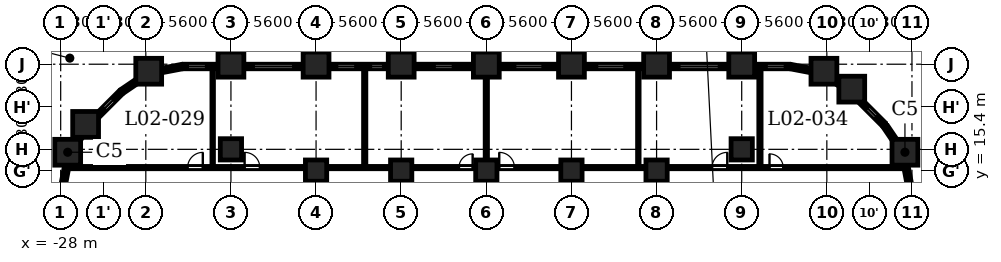
"""IFC4 building model, lengths in metres.
Left out: names, types, materials, properties, quantities, classifications, styles, units other than length and angle.
Written with IfcOpenShell. Run it as: python <this file> out.ifc"""

import sys

from ifc_helpers import new_model, si_unit, direction, frame, frame_2d, origin, origin_2d, place, context, subcontext, project, spatial, rectangle, extrude, element, fill, save


model = new_model("IFC4")
c1 = context("Model", 3, precision=1e-05, world=origin(), true_north=direction((0.0, 1.0)))
c2 = subcontext(c1, "Body", "Model", "MODEL_VIEW")
j1 = project(units=[si_unit("LENGTHUNIT", "METRE"), si_unit("PLANEANGLEUNIT", "RADIAN")], contexts=[c1])
p1 = place(None, origin())
s1 = spatial("IfcSite", under=j1, at=p1, CompositionType="ELEMENT")
p2 = place(p1, origin())
s2 = spatial("IfcBuilding", under=s1, at=p2, CompositionType="ELEMENT")
p3 = place(p2, frame((0.0, 0.0, 11.3)))
s3 = spatial("IfcBuildingStorey", under=s2, at=p3, CompositionType="ELEMENT", Elevation=11.3)
for number, where, z_axis, x_axis in (
    (1, (27.538, 16.609, 0.0), (0.0, 0.0, 1.0), (1.0, 0.0, 0.0)),
    (2, (24.04, 20.76, 0.0), (0.0, 0.0, 1.0), (1.0, 0.0, 0.0)),
    (3, (22.209, 21.938, 0.0), (0.0, 0.0, 1.0), (1.0, 0.0, 0.0)),
    (4, (16.8, 22.4, 0.0), (0.0, 0.0, 1.0), (1.0, 0.0, 0.0)),
    (5, (11.2, 22.4, 0.0), (0.0, 0.0, 1.0), (1.0, 0.0, 0.0)),
    (6, (5.6, 22.4, 0.0), (0.0, 0.0, 1.0), (1.0, 0.0, 0.0)),
    (7, (0.0, 22.4, 0.0), (0.0, 0.0, 1.0), (1.0, 0.0, 0.0)),
    (8, (-5.6, 22.4, 0.0), (0.0, 0.0, 1.0), (1.0, 0.0, 0.0)),
    (9, (-11.2, 22.4, 0.0), (0.0, 0.0, 1.0), (1.0, 0.0, 0.0)),
    (10, (-16.8, 22.4, 0.0), (0.0, 0.0, 1.0), (1.0, 0.0, 0.0)),
    (11, (-22.209, 21.938, 0.0), (0.0, 0.0, 1.0), (1.0, 0.0, 0.0)),
    (12, (-26.36, 18.44, 0.0), (0.0, 0.0, 1.0), (1.0, 0.0, 0.0)),
    (13, (-27.538, 16.609, 0.0), (0.0, 0.0, 1.0), (1.0, 0.0, 0.0)),
):
    element("IfcColumn", number, at=place(p3, frame(where, z_axis=z_axis, x_axis=x_axis)), inside=s3, PredefinedType="COLUMN", context=c2, shape_type="SweptSolid", body=[
        extrude(rectangle(XDim=1.7, YDim=1.7, at=origin_2d()), origin(), (0.0, 0.0, 1.0), 4.8),
    ])
for number, where, z_axis, x_axis in (
    (14, (-16.8, 16.8, 0.0), (0.0, 0.0, 1.0), (1.0, 0.0, 0.0)),
    (15, (16.8, 16.8, 0.0), (0.0, 0.0, 1.0), (1.0, 0.0, 0.0)),
    (16, (-11.2, 15.4, 0.0), (0.0, 0.0, 1.0), (1.0, 0.0, 0.0)),
    (17, (-5.6, 15.4, 0.0), (0.0, 0.0, 1.0), (1.0, 0.0, 0.0)),
    (18, (0.0, 15.4, 0.0), (0.0, 0.0, 1.0), (1.0, 0.0, 0.0)),
    (19, (5.6, 15.4, 0.0), (0.0, 0.0, 1.0), (1.0, 0.0, 0.0)),
    (20, (11.2, 15.4, 0.0), (0.0, 0.0, 1.0), (1.0, 0.0, 0.0)),
):
    element("IfcColumn", number, at=place(p3, frame(where, z_axis=z_axis, x_axis=x_axis)), inside=s3, PredefinedType="COLUMN", context=c2, shape_type="SweptSolid", body=[
        extrude(rectangle(XDim=1.4, YDim=1.4, at=origin_2d()), origin(), (0.0, 0.0, 1.0), 4.8),
    ])
for number, where, z_axis, x_axis in (
    (21, (27.853, 14.372, 0.0), (0.0, 0.0, 1.0), (-0.187, 0.982, 0.0)),
    (22, (26.969, 17.25, 0.0), (0.0, 0.0, 1.0), (-0.562, 0.827, 0.0)),
):
    element("IfcWall", number, at=place(p3, frame(where, z_axis=z_axis, x_axis=x_axis)), inside=s3, PredefinedType="SOLIDWALL", context=c2, shape_type="SweptSolid", body=[
        extrude(rectangle(XDim=1.406, YDim=0.3, at=frame_2d((0.703, 0.0))), origin(), (0.0, 0.0, 1.0), 3.55),
    ])
p4 = place(p3, frame((26.197, 18.391, 0.0), z_axis=(0.0, 0.0, 1.0), x_axis=(-0.707054835785, 0.707158722772, 0.0)))
e23 = element("IfcWall", 23, at=p4, inside=s3, PredefinedType="SOLIDWALL", context=c2, shape_type="SweptSolid", body=[
    extrude(rectangle(XDim=2.35, YDim=0.3, at=frame_2d((1.175, 0.0))), origin(), (0.0, 0.0, 1.0), 3.55),
])
p5 = place(p4, frame((0.775, 0.0, 0.6)))
e24 = element("IfcOpeningElement", 24, at=p5, cuts=e23, PredefinedType="OPENING", context=c2, shape_type="SweptSolid", body=[
    extrude(rectangle(XDim=0.8, YDim=1.55, at=frame_2d((0.4, 0.775))), frame((0.0, 0.16, 0.0), z_axis=(0.0, -1.0, 0.0), x_axis=(1.0, 0.0, 0.0)), (0.0, 0.0, 1.0), 0.32),
])
p6 = place(p3, frame((23.244, 21.101, 0.0), z_axis=(0.0, 0.0, 1.0), x_axis=(-0.827135885329, 0.562001981492, 0.0)))
e25 = element("IfcWall", 25, at=p6, inside=s3, PredefinedType="SOLIDWALL", context=c2, shape_type="SweptSolid", body=[
    extrude(rectangle(XDim=0.477, YDim=0.3, at=frame_2d((0.239, 0.0))), origin(), (0.0, 0.0, 1.0), 4.45),
])
p7 = place(p3, frame((21.353, 21.989, 0.0), z_axis=(0.0, 0.0, 1.0), x_axis=(-0.98229142023, 0.187359455971, 0.0)))
e26 = element("IfcWall", 26, at=p7, inside=s3, PredefinedType="SOLIDWALL", context=c2, shape_type="SweptSolid", body=[
    extrude(rectangle(XDim=1.406, YDim=0.3, at=frame_2d((0.703, 0.0))), origin(), (0.0, 0.0, 1.0), 3.55),
])
p8 = place(p3, frame((20.0, 22.25, 0.0), z_axis=(0.0, 0.0, 1.0), x_axis=(-1.0, 0.0, 0.0)))
e27 = element("IfcWall", 27, at=p8, inside=s3, PredefinedType="SOLIDWALL", context=c2, shape_type="SweptSolid", body=[
    extrude(rectangle(XDim=2.35, YDim=0.3, at=frame_2d((1.175, 0.0))), origin(), (0.0, 0.0, 1.0), 3.55),
])
p9 = place(p8, frame((0.363, 0.0, 0.6)))
e28 = element("IfcOpeningElement", 28, at=p9, cuts=e27, PredefinedType="OPENING", context=c2, shape_type="SweptSolid", body=[
    extrude(rectangle(XDim=1.2, YDim=1.55, at=frame_2d((0.6, 0.775))), frame((0.0, 0.16, 0.0), z_axis=(0.0, -1.0, 0.0), x_axis=(1.0, 0.0, 0.0)), (0.0, 0.0, 1.0), 0.32),
])
p10 = place(p3, frame((15.95, 22.25, 0.0), z_axis=(0.0, 0.0, 1.0), x_axis=(-1.0, 0.0, 0.0)))
e29 = element("IfcWall", 29, at=p10, inside=s3, PredefinedType="SOLIDWALL", context=c2, shape_type="SweptSolid", body=[
    extrude(rectangle(XDim=3.9, YDim=0.3, at=frame_2d((1.95, 0.0))), origin(), (0.0, 0.0, 1.0), 3.55),
])
p11 = place(p10, frame((0.65, 0.0, 0.9)))
e30 = element("IfcOpeningElement", 30, at=p11, cuts=e29, PredefinedType="OPENING", context=c2, shape_type="SweptSolid", body=[
    extrude(rectangle(XDim=2.6, YDim=1.25, at=frame_2d((1.3, 0.625))), frame((0.0, 0.16, 0.0), z_axis=(0.0, -1.0, 0.0), x_axis=(1.0, 0.0, 0.0)), (0.0, 0.0, 1.0), 0.32),
])
p12 = place(p3, frame((10.35, 22.25, 0.0), z_axis=(0.0, 0.0, 1.0), x_axis=(-1.0, 0.0, 0.0)))
e31 = element("IfcWall", 31, at=p12, inside=s3, PredefinedType="SOLIDWALL", context=c2, shape_type="SweptSolid", body=[
    extrude(rectangle(XDim=3.9, YDim=0.3, at=frame_2d((1.95, 0.0))), origin(), (0.0, 0.0, 1.0), 3.55),
])
p13 = place(p12, frame((1.262, 0.0, 0.9)))
e32 = element("IfcOpeningElement", 32, at=p13, cuts=e31, PredefinedType="OPENING", context=c2, shape_type="SweptSolid", body=[
    extrude(rectangle(XDim=1.8, YDim=1.25, at=frame_2d((0.9, 0.625))), frame((0.0, 0.16, 0.0), z_axis=(0.0, -1.0, 0.0), x_axis=(1.0, 0.0, 0.0)), (0.0, 0.0, 1.0), 0.32),
])
p14 = place(p3, frame((4.75, 22.25, 0.0), z_axis=(0.0, 0.0, 1.0), x_axis=(-1.0, 0.0, 0.0)))
e33 = element("IfcWall", 33, at=p14, inside=s3, PredefinedType="SOLIDWALL", context=c2, shape_type="SweptSolid", body=[
    extrude(rectangle(XDim=3.9, YDim=0.3, at=frame_2d((1.95, 0.0))), origin(), (0.0, 0.0, 1.0), 3.55),
])
p15 = place(p14, frame((1.05, 0.0, 0.9)))
e34 = element("IfcOpeningElement", 34, at=p15, cuts=e33, PredefinedType="OPENING", context=c2, shape_type="SweptSolid", body=[
    extrude(rectangle(XDim=1.8, YDim=1.25, at=frame_2d((0.9, 0.625))), frame((0.0, 0.16, 0.0), z_axis=(0.0, -1.0, 0.0), x_axis=(1.0, 0.0, 0.0)), (0.0, 0.0, 1.0), 0.32),
])
p16 = place(p3, frame((-0.85, 22.25, 0.0), z_axis=(0.0, 0.0, 1.0), x_axis=(-1.0, 0.0, 0.0)))
e35 = element("IfcWall", 35, at=p16, inside=s3, PredefinedType="SOLIDWALL", context=c2, shape_type="SweptSolid", body=[
    extrude(rectangle(XDim=3.9, YDim=0.3, at=frame_2d((1.95, 0.0))), origin(), (0.0, 0.0, 1.0), 3.55),
])
p17 = place(p16, frame((1.35, 0.0, 0.6)))
e36 = element("IfcOpeningElement", 36, at=p17, cuts=e35, PredefinedType="OPENING", context=c2, shape_type="SweptSolid", body=[
    extrude(rectangle(XDim=1.2, YDim=1.55, at=frame_2d((0.6, 0.775))), frame((0.0, 0.16, 0.0), z_axis=(0.0, -1.0, 0.0), x_axis=(1.0, 0.0, 0.0)), (0.0, 0.0, 1.0), 0.32),
])
p18 = place(p3, frame((-6.45, 22.25, 0.0), z_axis=(0.0, 0.0, 1.0), x_axis=(-1.0, 0.0, 0.0)))
e37 = element("IfcWall", 37, at=p18, inside=s3, PredefinedType="SOLIDWALL", context=c2, shape_type="SweptSolid", body=[
    extrude(rectangle(XDim=3.9, YDim=0.3, at=frame_2d((1.95, 0.0))), origin(), (0.0, 0.0, 1.0), 3.55),
])
p19 = place(p18, frame((0.337, 0.0, 0.6)))
e38 = element("IfcOpeningElement", 38, at=p19, cuts=e37, PredefinedType="OPENING", context=c2, shape_type="SweptSolid", body=[
    extrude(rectangle(XDim=0.8, YDim=1.55, at=frame_2d((0.4, 0.775))), frame((0.0, 0.16, 0.0), z_axis=(0.0, -1.0, 0.0), x_axis=(1.0, 0.0, 0.0)), (0.0, 0.0, 1.0), 0.32),
])
p20 = place(p18, frame((2.163, 0.0, 0.6)))
e39 = element("IfcOpeningElement", 39, at=p20, cuts=e37, PredefinedType="OPENING", context=c2, shape_type="SweptSolid", body=[
    extrude(rectangle(XDim=1.2, YDim=1.55, at=frame_2d((0.6, 0.775))), frame((0.0, 0.16, 0.0), z_axis=(0.0, -1.0, 0.0), x_axis=(1.0, 0.0, 0.0)), (0.0, 0.0, 1.0), 0.32),
])
p21 = place(p3, frame((-12.05, 22.25, 0.0), z_axis=(0.0, 0.0, 1.0), x_axis=(-1.0, 0.0, 0.0)))
e40 = element("IfcWall", 40, at=p21, inside=s3, PredefinedType="SOLIDWALL", context=c2, shape_type="SweptSolid", body=[
    extrude(rectangle(XDim=3.9, YDim=0.3, at=frame_2d((1.95, 0.0))), origin(), (0.0, 0.0, 1.0), 3.55),
])
p22 = place(p21, frame((0.65, 0.0, 0.9)))
e41 = element("IfcOpeningElement", 41, at=p22, cuts=e40, PredefinedType="OPENING", context=c2, shape_type="SweptSolid", body=[
    extrude(rectangle(XDim=2.6, YDim=1.25, at=frame_2d((1.3, 0.625))), frame((0.0, 0.16, 0.0), z_axis=(0.0, -1.0, 0.0), x_axis=(1.0, 0.0, 0.0)), (0.0, 0.0, 1.0), 0.32),
])
p23 = place(p3, frame((-17.65, 22.25, 0.0), z_axis=(0.0, 0.0, 1.0), x_axis=(-1.0, 0.0, 0.0)))
e42 = element("IfcWall", 42, at=p23, inside=s3, PredefinedType="SOLIDWALL", context=c2, shape_type="SweptSolid", body=[
    extrude(rectangle(XDim=2.35, YDim=0.3, at=frame_2d((1.175, 0.0))), origin(), (0.0, 0.0, 1.0), 3.55),
])
p24 = place(p23, frame((0.788, 0.0, 0.6)))
e43 = element("IfcOpeningElement", 43, at=p24, cuts=e42, PredefinedType="OPENING", context=c2, shape_type="SweptSolid", body=[
    extrude(rectangle(XDim=1.2, YDim=1.55, at=frame_2d((0.6, 0.775))), frame((0.0, 0.16, 0.0), z_axis=(0.0, -1.0, 0.0), x_axis=(1.0, 0.0, 0.0)), (0.0, 0.0, 1.0), 0.32),
])
for number, where, z_axis, x_axis in (
    (44, (-19.972, 22.253, 0.0), (0.0, 0.0, 1.0), (-0.982, -0.187, 0.0)),
    (45, (-22.85, 21.369, 0.0), (0.0, 0.0, 1.0), (-0.827, -0.562, 0.0)),
):
    element("IfcWall", number, at=place(p3, frame(where, z_axis=z_axis, x_axis=x_axis)), inside=s3, PredefinedType="SOLIDWALL", context=c2, shape_type="SweptSolid", body=[
        extrude(rectangle(XDim=1.406, YDim=0.3, at=frame_2d((0.703, 0.0))), origin(), (0.0, 0.0, 1.0), 3.55),
    ])
p25 = place(p3, frame((-23.991, 20.597, 0.0), z_axis=(0.0, 0.0, 1.0), x_axis=(-0.707054835785, -0.707158722772, 0.0)))
e46 = element("IfcWall", 46, at=p25, inside=s3, PredefinedType="SOLIDWALL", context=c2, shape_type="SweptSolid", body=[
    extrude(rectangle(XDim=2.35, YDim=0.3, at=frame_2d((1.175, 0.0))), origin(), (0.0, 0.0, 1.0), 3.55),
])
p26 = place(p25, frame((0.775, 0.0, 0.6)))
e47 = element("IfcOpeningElement", 47, at=p26, cuts=e46, PredefinedType="OPENING", context=c2, shape_type="SweptSolid", body=[
    extrude(rectangle(XDim=0.8, YDim=1.55, at=frame_2d((0.4, 0.775))), frame((0.0, 0.16, 0.0), z_axis=(0.0, -1.0, 0.0), x_axis=(1.0, 0.0, 0.0)), (0.0, 0.0, 1.0), 0.32),
])
p27 = place(p3, frame((-26.701, 17.644, 0.0), z_axis=(0.0, 0.0, 1.0), x_axis=(-0.562001981492, -0.827135885329, 0.0)))
e48 = element("IfcWall", 48, at=p27, inside=s3, PredefinedType="SOLIDWALL", context=c2, shape_type="SweptSolid", body=[
    extrude(rectangle(XDim=0.477, YDim=0.3, at=frame_2d((0.239, 0.0))), origin(), (0.0, 0.0, 1.0), 4.45),
])
p28 = place(p3, frame((-27.589, 15.753, 0.0), z_axis=(0.0, 0.0, 1.0), x_axis=(-0.187327504018, -0.982297514116, 0.0)))
e49 = element("IfcWall", 49, at=p28, inside=s3, PredefinedType="SOLIDWALL", context=c2, shape_type="SweptSolid", body=[
    extrude(rectangle(XDim=1.406, YDim=0.3, at=frame_2d((0.703, 0.0))), origin(), (0.0, 0.0, 1.0), 3.55),
])
p29 = place(p3, frame((-27.446, 15.6, 0.0), z_axis=(0.0, 0.0, 1.0), x_axis=(1.0, 0.0, 0.0)))
e50 = element("IfcWall", 50, at=p29, inside=s3, PredefinedType="PARTITIONING", context=c2, shape_type="SweptSolid", body=[
    extrude(rectangle(XDim=54.892, YDim=0.15, at=frame_2d((27.446, 0.0))), origin(), (0.0, 0.0, 1.0), 4.45),
])
p30 = place(p29, frame((7.796, 0.0, 0.0)))
e51 = element("IfcOpeningElement", 51, at=p30, cuts=e50, PredefinedType="OPENING", context=c2, shape_type="SweptSolid", body=[
    extrude(rectangle(XDim=1.0, YDim=2.1, at=frame_2d((0.5, 1.05))), frame((0.0, 0.085, 0.0), z_axis=(0.0, -1.0, 0.0), x_axis=(1.0, 0.0, 0.0)), (0.0, 0.0, 1.0), 0.17),
])
p31 = place(p29, frame((11.546, 0.0, 0.0)))
e52 = element("IfcOpeningElement", 52, at=p31, cuts=e50, PredefinedType="OPENING", context=c2, shape_type="SweptSolid", body=[
    extrude(rectangle(XDim=1.0, YDim=2.1, at=frame_2d((0.5, 1.05))), frame((0.0, 0.085, 0.0), z_axis=(0.0, -1.0, 0.0), x_axis=(1.0, 0.0, 0.0)), (0.0, 0.0, 1.0), 0.17),
])
p32 = place(p29, frame((25.646, 0.0, 0.0)))
e53 = element("IfcOpeningElement", 53, at=p32, cuts=e50, PredefinedType="OPENING", context=c2, shape_type="SweptSolid", body=[
    extrude(rectangle(XDim=0.9, YDim=2.1, at=frame_2d((0.45, 1.05))), frame((0.0, 0.085, 0.0), z_axis=(0.0, -1.0, 0.0), x_axis=(1.0, 0.0, 0.0)), (0.0, 0.0, 1.0), 0.17),
])
p33 = place(p29, frame((28.296, 0.0, 0.0)))
e54 = element("IfcOpeningElement", 54, at=p33, cuts=e50, PredefinedType="OPENING", context=c2, shape_type="SweptSolid", body=[
    extrude(rectangle(XDim=1.0, YDim=2.1, at=frame_2d((0.5, 1.05))), frame((0.0, 0.085, 0.0), z_axis=(0.0, -1.0, 0.0), x_axis=(1.0, 0.0, 0.0)), (0.0, 0.0, 1.0), 0.17),
])
p34 = place(p29, frame((42.296, 0.0, 0.0)))
e55 = element("IfcOpeningElement", 55, at=p34, cuts=e50, PredefinedType="OPENING", context=c2, shape_type="SweptSolid", body=[
    extrude(rectangle(XDim=1.0, YDim=2.1, at=frame_2d((0.5, 1.05))), frame((0.0, 0.085, 0.0), z_axis=(0.0, -1.0, 0.0), x_axis=(1.0, 0.0, 0.0)), (0.0, 0.0, 1.0), 0.17),
])
p35 = place(p29, frame((46.075, 0.0, 0.0)))
e56 = element("IfcOpeningElement", 56, at=p35, cuts=e50, PredefinedType="OPENING", context=c2, shape_type="SweptSolid", body=[
    extrude(rectangle(XDim=0.9, YDim=2.1, at=frame_2d((0.45, 1.05))), frame((0.0, 0.085, 0.0), z_axis=(0.0, -1.0, 0.0), x_axis=(1.0, 0.0, 0.0)), (0.0, 0.0, 1.0), 0.17),
])
p36 = place(p3, frame((-18.0, 15.675, 0.0), z_axis=(0.0, 0.0, 1.0), x_axis=(0.0, 1.0, 0.0)))
e57 = element("IfcWall", 57, at=p36, inside=s3, PredefinedType="PARTITIONING", context=c2, shape_type="SweptSolid", body=[
    extrude(rectangle(XDim=6.405, YDim=0.1, at=frame_2d((3.203, 0.0))), origin(), (0.0, 0.0, 1.0), 4.45),
])
p37 = place(p3, frame((-8.0, 15.675, 0.0), z_axis=(0.0, 0.0, 1.0), x_axis=(0.0, 1.0, 0.0)))
e58 = element("IfcWall", 58, at=p37, inside=s3, PredefinedType="PARTITIONING", context=c2, shape_type="SweptSolid", body=[
    extrude(rectangle(XDim=6.405, YDim=0.15, at=frame_2d((3.203, 0.0))), origin(), (0.0, 0.0, 1.0), 4.45),
])
p38 = place(p3, frame((0.0, 15.675, 0.0), z_axis=(0.0, 0.0, 1.0), x_axis=(0.0, 1.0, 0.0)))
e59 = element("IfcWall", 59, at=p38, inside=s3, PredefinedType="PARTITIONING", context=c2, shape_type="SweptSolid", body=[
    extrude(rectangle(XDim=6.635, YDim=0.15, at=frame_2d((3.317, 0.0))), origin(), (0.0, 0.0, 1.0), 4.45),
])
p39 = place(p3, frame((10.0, 15.675, 0.0), z_axis=(0.0, 0.0, 1.0), x_axis=(0.0, 1.0, 0.0)))
e60 = element("IfcWall", 60, at=p39, inside=s3, PredefinedType="PARTITIONING", context=c2, shape_type="SweptSolid", body=[
    extrude(rectangle(XDim=6.405, YDim=0.1, at=frame_2d((3.203, 0.0))), origin(), (0.0, 0.0, 1.0), 4.45),
])
p40 = place(p3, frame((18.0, 15.675, 0.0), z_axis=(0.0, 0.0, 1.0), x_axis=(0.0, 1.0, 0.0)))
e61 = element("IfcWall", 61, at=p40, inside=s3, PredefinedType="PARTITIONING", context=c2, shape_type="SweptSolid", body=[
    extrude(rectangle(XDim=6.405, YDim=0.15, at=frame_2d((3.203, 0.0))), origin(), (0.0, 0.0, 1.0), 4.45),
])
p41 = place(p30, origin())
e62 = element("IfcDoor", 62, at=p41, inside=s3, OperationType="SINGLE_SWING_LEFT", PredefinedType="DOOR", context=c2, shape_type="SweptSolid", body=[
    extrude(rectangle(XDim=1.0, YDim=2.1, at=frame_2d((0.5, 1.05))), frame((0.0, 0.025, 0.0), z_axis=(0.0, -1.0, 0.0), x_axis=(1.0, 0.0, 0.0)), (0.0, 0.0, 1.0), 0.05),
])
fill(e51, e62)
p42 = place(p31, origin())
e63 = element("IfcDoor", 63, at=p42, inside=s3, OperationType="SINGLE_SWING_RIGHT", PredefinedType="DOOR", context=c2, shape_type="SweptSolid", body=[
    extrude(rectangle(XDim=1.0, YDim=2.1, at=frame_2d((0.5, 1.05))), frame((0.0, 0.025, 0.0), z_axis=(0.0, -1.0, 0.0), x_axis=(1.0, 0.0, 0.0)), (0.0, 0.0, 1.0), 0.05),
])
fill(e52, e63)
p43 = place(p32, origin())
e64 = element("IfcDoor", 64, at=p43, inside=s3, OperationType="SINGLE_SWING_LEFT", PredefinedType="DOOR", context=c2, shape_type="SweptSolid", body=[
    extrude(rectangle(XDim=0.9, YDim=2.1, at=frame_2d((0.45, 1.05))), frame((0.0, 0.025, 0.0), z_axis=(0.0, -1.0, 0.0), x_axis=(1.0, 0.0, 0.0)), (0.0, 0.0, 1.0), 0.05),
])
fill(e53, e64)
p44 = place(p33, origin())
e65 = element("IfcDoor", 65, at=p44, inside=s3, OperationType="SINGLE_SWING_RIGHT", PredefinedType="DOOR", context=c2, shape_type="SweptSolid", body=[
    extrude(rectangle(XDim=1.0, YDim=2.1, at=frame_2d((0.5, 1.05))), frame((0.0, 0.025, 0.0), z_axis=(0.0, -1.0, 0.0), x_axis=(1.0, 0.0, 0.0)), (0.0, 0.0, 1.0), 0.05),
])
fill(e54, e65)
p45 = place(p34, origin())
e66 = element("IfcDoor", 66, at=p45, inside=s3, OperationType="SINGLE_SWING_LEFT", PredefinedType="DOOR", context=c2, shape_type="SweptSolid", body=[
    extrude(rectangle(XDim=1.0, YDim=2.1, at=frame_2d((0.5, 1.05))), frame((0.0, 0.025, 0.0), z_axis=(0.0, -1.0, 0.0), x_axis=(1.0, 0.0, 0.0)), (0.0, 0.0, 1.0), 0.05),
])
fill(e55, e66)
p46 = place(p35, origin())
e67 = element("IfcDoor", 67, at=p46, inside=s3, OperationType="SINGLE_SWING_RIGHT", PredefinedType="DOOR", context=c2, shape_type="SweptSolid", body=[
    extrude(rectangle(XDim=0.9, YDim=2.1, at=frame_2d((0.45, 1.05))), frame((0.0, 0.025, 0.0), z_axis=(0.0, -1.0, 0.0), x_axis=(1.0, 0.0, 0.0)), (0.0, 0.0, 1.0), 0.05),
])
fill(e56, e67)
p47 = place(p5, origin())
e68 = element("IfcWindow", 68, at=p47, inside=s3, PartitioningType="SINGLE_PANEL", PredefinedType="WINDOW", context=c2, shape_type="SweptSolid", body=[
    extrude(rectangle(XDim=0.8, YDim=1.55, at=frame_2d((0.4, 0.775))), frame((0.0, 0.03, 0.0), z_axis=(0.0, -1.0, 0.0), x_axis=(1.0, 0.0, 0.0)), (0.0, 0.0, 1.0), 0.06),
])
fill(e24, e68)
p48 = place(p9, origin())
e69 = element("IfcWindow", 69, at=p48, inside=s3, PartitioningType="SINGLE_PANEL", PredefinedType="WINDOW", context=c2, shape_type="SweptSolid", body=[
    extrude(rectangle(XDim=1.2, YDim=1.55, at=frame_2d((0.6, 0.775))), frame((0.0, 0.03, 0.0), z_axis=(0.0, -1.0, 0.0), x_axis=(1.0, 0.0, 0.0)), (0.0, 0.0, 1.0), 0.06),
])
fill(e28, e69)
p49 = place(p11, origin())
e70 = element("IfcWindow", 70, at=p49, inside=s3, PartitioningType="SINGLE_PANEL", PredefinedType="WINDOW", context=c2, shape_type="SweptSolid", body=[
    extrude(rectangle(XDim=2.6, YDim=1.25, at=frame_2d((1.3, 0.625))), frame((0.0, 0.03, 0.0), z_axis=(0.0, -1.0, 0.0), x_axis=(1.0, 0.0, 0.0)), (0.0, 0.0, 1.0), 0.06),
])
fill(e30, e70)
p50 = place(p13, origin())
e71 = element("IfcWindow", 71, at=p50, inside=s3, PartitioningType="SINGLE_PANEL", PredefinedType="WINDOW", context=c2, shape_type="SweptSolid", body=[
    extrude(rectangle(XDim=1.8, YDim=1.25, at=frame_2d((0.9, 0.625))), frame((0.0, 0.03, 0.0), z_axis=(0.0, -1.0, 0.0), x_axis=(1.0, 0.0, 0.0)), (0.0, 0.0, 1.0), 0.06),
])
fill(e32, e71)
p51 = place(p15, origin())
e72 = element("IfcWindow", 72, at=p51, inside=s3, PartitioningType="SINGLE_PANEL", PredefinedType="WINDOW", context=c2, shape_type="SweptSolid", body=[
    extrude(rectangle(XDim=1.8, YDim=1.25, at=frame_2d((0.9, 0.625))), frame((0.0, 0.03, 0.0), z_axis=(0.0, -1.0, 0.0), x_axis=(1.0, 0.0, 0.0)), (0.0, 0.0, 1.0), 0.06),
])
fill(e34, e72)
p52 = place(p17, origin())
e73 = element("IfcWindow", 73, at=p52, inside=s3, PartitioningType="SINGLE_PANEL", PredefinedType="WINDOW", context=c2, shape_type="SweptSolid", body=[
    extrude(rectangle(XDim=1.2, YDim=1.55, at=frame_2d((0.6, 0.775))), frame((0.0, 0.03, 0.0), z_axis=(0.0, -1.0, 0.0), x_axis=(1.0, 0.0, 0.0)), (0.0, 0.0, 1.0), 0.06),
])
fill(e36, e73)
p53 = place(p19, origin())
e74 = element("IfcWindow", 74, at=p53, inside=s3, PartitioningType="SINGLE_PANEL", PredefinedType="WINDOW", context=c2, shape_type="SweptSolid", body=[
    extrude(rectangle(XDim=0.8, YDim=1.55, at=frame_2d((0.4, 0.775))), frame((0.0, 0.03, 0.0), z_axis=(0.0, -1.0, 0.0), x_axis=(1.0, 0.0, 0.0)), (0.0, 0.0, 1.0), 0.06),
])
fill(e38, e74)
p54 = place(p20, origin())
e75 = element("IfcWindow", 75, at=p54, inside=s3, PartitioningType="SINGLE_PANEL", PredefinedType="WINDOW", context=c2, shape_type="SweptSolid", body=[
    extrude(rectangle(XDim=1.2, YDim=1.55, at=frame_2d((0.6, 0.775))), frame((0.0, 0.03, 0.0), z_axis=(0.0, -1.0, 0.0), x_axis=(1.0, 0.0, 0.0)), (0.0, 0.0, 1.0), 0.06),
])
fill(e39, e75)
p55 = place(p22, origin())
e76 = element("IfcWindow", 76, at=p55, inside=s3, PartitioningType="SINGLE_PANEL", PredefinedType="WINDOW", context=c2, shape_type="SweptSolid", body=[
    extrude(rectangle(XDim=2.6, YDim=1.25, at=frame_2d((1.3, 0.625))), frame((0.0, 0.03, 0.0), z_axis=(0.0, -1.0, 0.0), x_axis=(1.0, 0.0, 0.0)), (0.0, 0.0, 1.0), 0.06),
])
fill(e41, e76)
p56 = place(p24, origin())
e77 = element("IfcWindow", 77, at=p56, inside=s3, PartitioningType="SINGLE_PANEL", PredefinedType="WINDOW", context=c2, shape_type="SweptSolid", body=[
    extrude(rectangle(XDim=1.2, YDim=1.55, at=frame_2d((0.6, 0.775))), frame((0.0, 0.03, 0.0), z_axis=(0.0, -1.0, 0.0), x_axis=(1.0, 0.0, 0.0)), (0.0, 0.0, 1.0), 0.06),
])
fill(e43, e77)
p57 = place(p26, origin())
e78 = element("IfcWindow", 78, at=p57, inside=s3, PartitioningType="SINGLE_PANEL", PredefinedType="WINDOW", context=c2, shape_type="SweptSolid", body=[
    extrude(rectangle(XDim=0.8, YDim=1.55, at=frame_2d((0.4, 0.775))), frame((0.0, 0.03, 0.0), z_axis=(0.0, -1.0, 0.0), x_axis=(1.0, 0.0, 0.0)), (0.0, 0.0, 1.0), 0.06),
])
fill(e47, e78)
save(model, sys.argv[1])
